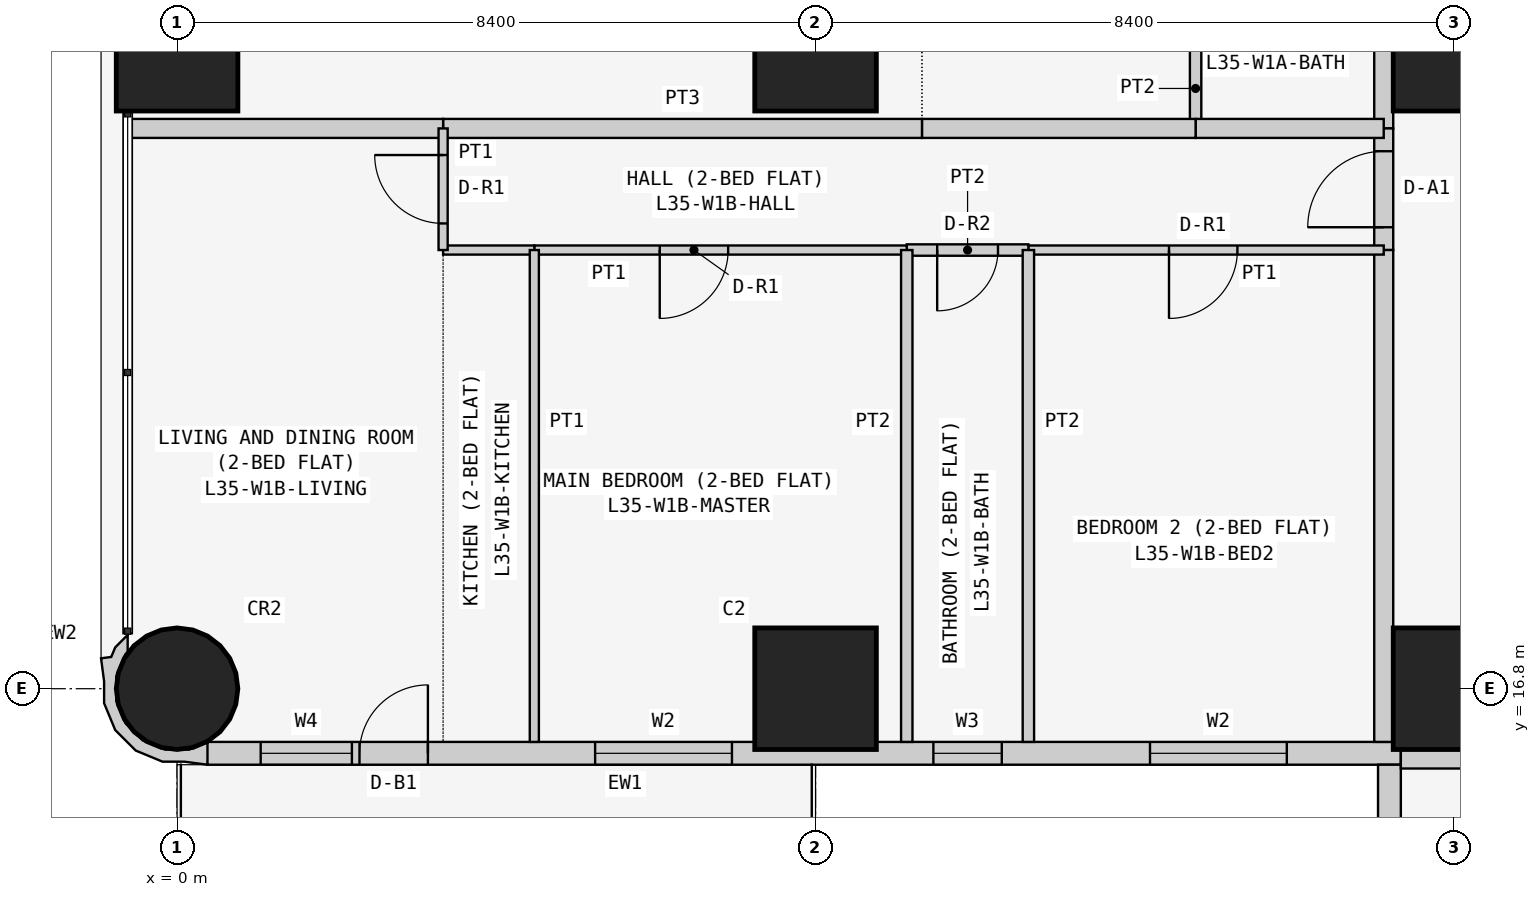
"""IFC4 building model, lengths in metres.
Left out: names, types, materials, properties, quantities, classifications, styles, units other than length and angle.
Written with IfcOpenShell. Run it as: python <this file> out.ifc"""

import sys

from ifc_helpers import new_model, si_unit, direction, frame, frame_2d, origin, origin_2d, place, context, subcontext, project, spatial, polyline, rectangle, circle, outline, extrude, element, fill, save


model = new_model("IFC4")
c1 = context("Model", 3, precision=1e-05, world=origin(), true_north=direction((0.0, 1.0)))
c2 = subcontext(c1, "Body", "Model", "MODEL_VIEW")
j1 = project(units=[si_unit("LENGTHUNIT", "METRE"), si_unit("PLANEANGLEUNIT", "RADIAN")], contexts=[c1])
p1 = place(None, origin())
s1 = spatial("IfcSite", under=j1, at=p1, CompositionType="ELEMENT")
p2 = place(p1, origin())
s2 = spatial("IfcBuilding", under=s1, at=p2, CompositionType="ELEMENT")
p3 = place(p2, frame((0.0, 0.0, 137.7)))
s3 = spatial("IfcBuildingStorey", under=s2, at=p3, CompositionType="ELEMENT", Elevation=137.7)
p4 = place(p3, frame((0.0, 16.8, 0.0), z_axis=(0.0, 0.0, 1.0), x_axis=(1.0, 0.0, 0.0)))
e1 = element("IfcColumn", 1, at=p4, inside=s3, PredefinedType="COLUMN", context=c2, shape_type="SweptSolid", body=[
    extrude(circle(Radius=0.8, at=origin_2d()), origin(), (0.0, 0.0, 1.0), 3.6),
])
for number, where, z_axis, x_axis in (
    (2, (0.0, 25.2, 0.0), (0.0, 0.0, 1.0), (1.0, 0.0, 0.0)),
    (3, (8.4, 16.8, 0.0), (0.0, 0.0, 1.0), (1.0, 0.0, 0.0)),
    (4, (8.4, 25.2, 0.0), (0.0, 0.0, 1.0), (1.0, 0.0, 0.0)),
    (5, (16.8, 16.8, 0.0), (0.0, 0.0, 1.0), (1.0, 0.0, 0.0)),
    (6, (16.8, 25.2, 0.0), (0.0, 0.0, 1.0), (1.0, 0.0, 0.0)),
):
    element("IfcColumn", number, at=place(p3, frame(where, z_axis=z_axis, x_axis=x_axis)), inside=s3, PredefinedType="COLUMN", context=c2, shape_type="SweptSolid", body=[
        extrude(rectangle(XDim=1.6, YDim=1.6, at=origin_2d()), origin(), (0.0, 0.0, 1.0), 3.6),
    ])
p5 = place(p3, frame((0.4, 15.95, 0.0), z_axis=(0.0, 0.0, 1.0), x_axis=(1.0, 0.0, 0.0)))
e7 = element("IfcWall", 7, at=p5, inside=s3, PredefinedType="SOLIDWALL", context=c2, shape_type="SweptSolid", body=[
    extrude(rectangle(XDim=15.7, YDim=0.3, at=frame_2d((7.85, 0.0))), origin(), (0.0, 0.0, 1.0), 3.45),
])
p6 = place(p5, frame((12.4, 0.0, 0.9)))
e8 = element("IfcOpeningElement", 8, at=p6, cuts=e7, PredefinedType="OPENING", context=c2, shape_type="SweptSolid", body=[
    extrude(rectangle(XDim=1.8, YDim=1.5, at=frame_2d((0.9, 0.75))), frame((0.0, 0.16, 0.0), z_axis=(0.0, -1.0, 0.0), x_axis=(1.0, 0.0, 0.0)), (0.0, 0.0, 1.0), 0.32),
])
p7 = place(p5, frame((9.55, 0.0, 1.5)))
e9 = element("IfcOpeningElement", 9, at=p7, cuts=e7, PredefinedType="OPENING", context=c2, shape_type="SweptSolid", body=[
    extrude(rectangle(XDim=0.9, YDim=0.7, at=frame_2d((0.45, 0.35))), frame((0.0, 0.16, 0.0), z_axis=(0.0, -1.0, 0.0), x_axis=(1.0, 0.0, 0.0)), (0.0, 0.0, 1.0), 0.32),
])
p8 = place(p5, frame((5.1, 0.0, 0.9)))
e10 = element("IfcOpeningElement", 10, at=p8, cuts=e7, PredefinedType="OPENING", context=c2, shape_type="SweptSolid", body=[
    extrude(rectangle(XDim=1.8, YDim=1.5, at=frame_2d((0.9, 0.75))), frame((0.0, 0.16, 0.0), z_axis=(0.0, -1.0, 0.0), x_axis=(1.0, 0.0, 0.0)), (0.0, 0.0, 1.0), 0.32),
])
p9 = place(p5, frame((2.0, 0.0, 0.0)))
e11 = element("IfcOpeningElement", 11, at=p9, cuts=e7, PredefinedType="OPENING", context=c2, shape_type="SweptSolid", body=[
    extrude(rectangle(XDim=0.9, YDim=2.4, at=frame_2d((0.45, 1.2))), frame((0.0, 0.16, 0.0), z_axis=(0.0, -1.0, 0.0), x_axis=(1.0, 0.0, 0.0)), (0.0, 0.0, 1.0), 0.32),
])
p10 = place(p5, frame((0.7, 0.0, 0.9)))
e12 = element("IfcOpeningElement", 12, at=p10, cuts=e7, PredefinedType="OPENING", context=c2, shape_type="SweptSolid", body=[
    extrude(rectangle(XDim=1.2, YDim=1.5, at=frame_2d((0.6, 0.75))), frame((0.0, 0.16, 0.0), z_axis=(0.0, -1.0, 0.0), x_axis=(1.0, 0.0, 0.0)), (0.0, 0.0, 1.0), 0.32),
])
p11 = place(p3, frame((15.95, 15.8, 0.0), z_axis=(0.0, 0.0, 1.0), x_axis=(0.0, -1.0, 0.0)))
e13 = element("IfcWall", 13, at=p11, inside=s3, PredefinedType="SOLIDWALL", context=c2, shape_type="SweptSolid", body=[
    extrude(rectangle(XDim=7.0, YDim=0.3, at=frame_2d((3.5, 0.0))), origin(), (0.0, 0.0, 1.0), 3.45),
])
p12 = place(p11, frame((1.5, 0.0, 0.9)))
e14 = element("IfcOpeningElement", 14, at=p12, cuts=e13, PredefinedType="OPENING", context=c2, shape_type="SweptSolid", body=[
    extrude(rectangle(XDim=2.4, YDim=1.5, at=frame_2d((1.2, 0.75))), frame((0.0, 0.16, 0.0), z_axis=(0.0, -1.0, 0.0), x_axis=(1.0, 0.0, 0.0)), (0.0, 0.0, 1.0), 0.32),
])
p13 = place(p11, frame((5.05, 0.0, 0.9)))
e15 = element("IfcOpeningElement", 15, at=p13, cuts=e13, PredefinedType="OPENING", context=c2, shape_type="SweptSolid", body=[
    extrude(rectangle(XDim=1.2, YDim=1.5, at=frame_2d((0.6, 0.75))), frame((0.0, 0.16, 0.0), z_axis=(0.0, -1.0, 0.0), x_axis=(1.0, 0.0, 0.0)), (0.0, 0.0, 1.0), 0.32),
])
p14 = place(p3, frame((-0.595, 17.448, 0.0), z_axis=(0.0, 0.0, 1.0), x_axis=(-0.93923434088, -0.343276641956, 0.0)))
e16 = element("IfcWall", 16, at=p14, inside=s3, PredefinedType="SOLIDWALL", context=c2, shape_type="SweptSolid", body=[
    extrude(outline(polyline([(-0.369, 1.89), (-0.509, 1.621), (-0.491, 1.614), (-0.479, 1.609), (-0.211, 1.62), (0.088, 1.511), (0.323, 1.295), (0.457, 1.006), (0.47, 0.688), (0.361, 0.389), (0.146, 0.154), (0.108, 0.137), (0.031, -0.075), (0.241, 0.023), (0.334, 0.124), (0.465, 0.094), (0.532, 0.393), (0.631, 0.663), (0.614, 1.045), (0.453, 1.391), (0.172, 1.649), (-0.098, 1.748), (-0.369, 1.89)])), origin(), (0.0, 0.0, 1.0), 3.45),
])
p15 = place(p3, frame((22.971, 15.875, 0.0), z_axis=(0.0, 0.0, 1.0), x_axis=(-1.0, 0.0, 0.0)))
e17 = element("IfcWall", 17, at=p15, inside=s3, PredefinedType="PARTITIONING", context=c2, shape_type="SweptSolid", body=[
    extrude(rectangle(XDim=6.871, YDim=0.25, at=frame_2d((3.436, 0.0))), origin(), (0.0, 0.0, 1.0), 3.45),
])
p16 = place(p3, frame((15.875, 24.171, 0.0), z_axis=(0.0, 0.0, 1.0), x_axis=(0.0, 1.0, 0.0)))
e18 = element("IfcWall", 18, at=p16, inside=s3, PredefinedType="PARTITIONING", context=c2, shape_type="SweptSolid", body=[
    extrude(rectangle(XDim=2.629, YDim=0.25, at=frame_2d((1.314, 0.0))), origin(), (0.0, 0.0, 1.0), 3.45),
])
p17 = place(p3, frame((15.875, 22.571, 0.0), z_axis=(0.0, 0.0, 1.0), x_axis=(0.0, 1.0, 0.0)))
e19 = element("IfcWall", 19, at=p17, inside=s3, PredefinedType="PARTITIONING", context=c2, shape_type="SweptSolid", body=[
    extrude(rectangle(XDim=1.6, YDim=0.25, at=frame_2d((0.8, 0.0))), origin(), (0.0, 0.0, 1.0), 3.45),
])
p18 = place(p17, frame((0.3, 0.0, 0.0)))
e20 = element("IfcOpeningElement", 20, at=p18, cuts=e19, PredefinedType="OPENING", context=c2, shape_type="SweptSolid", body=[
    extrude(rectangle(XDim=1.0, YDim=2.1, at=frame_2d((0.5, 1.05))), frame((0.0, 0.135, 0.0), z_axis=(0.0, -1.0, 0.0), x_axis=(1.0, 0.0, 0.0)), (0.0, 0.0, 1.0), 0.27),
])
p19 = place(p3, frame((15.875, 16.1, 0.0), z_axis=(0.0, 0.0, 1.0), x_axis=(0.0, 1.0, 0.0)))
e21 = element("IfcWall", 21, at=p19, inside=s3, PredefinedType="PARTITIONING", context=c2, shape_type="SweptSolid", body=[
    extrude(rectangle(XDim=6.471, YDim=0.25, at=frame_2d((3.235, 0.0))), origin(), (0.0, 0.0, 1.0), 3.45),
])
p20 = place(p3, frame((13.4, 26.8, 0.0), z_axis=(0.0, 0.0, 1.0), x_axis=(0.0, -1.0, 0.0)))
e22 = element("IfcWall", 22, at=p20, inside=s3, PredefinedType="PARTITIONING", context=c2, shape_type="SweptSolid", body=[
    extrude(rectangle(XDim=2.629, YDim=0.15, at=frame_2d((1.314, 0.0))), origin(), (0.0, 0.0, 1.0), 3.45),
])
p21 = place(p3, frame((13.4, 24.171, 0.0), z_axis=(0.0, 0.0, 1.0), x_axis=(1.0, 0.0, 0.0)))
e23 = element("IfcWall", 23, at=p21, inside=s3, PredefinedType="PARTITIONING", context=c2, shape_type="SweptSolid", body=[
    extrude(rectangle(XDim=2.475, YDim=0.25, at=frame_2d((1.238, 0.0))), origin(), (0.0, 0.0, 1.0), 3.45),
])
p22 = place(p3, frame((9.8, 24.171, 0.0), z_axis=(0.0, 0.0, 1.0), x_axis=(1.0, 0.0, 0.0)))
e24 = element("IfcWall", 24, at=p22, inside=s3, PredefinedType="PARTITIONING", context=c2, shape_type="SweptSolid", body=[
    extrude(rectangle(XDim=3.6, YDim=0.25, at=frame_2d((1.8, 0.0))), origin(), (0.0, 0.0, 1.0), 3.45),
])
p23 = place(p3, frame((3.5, 24.171, 0.0), z_axis=(0.0, 0.0, 1.0), x_axis=(1.0, 0.0, 0.0)))
e25 = element("IfcWall", 25, at=p23, inside=s3, PredefinedType="PARTITIONING", context=c2, shape_type="SweptSolid", body=[
    extrude(rectangle(XDim=6.3, YDim=0.25, at=frame_2d((3.15, 0.0))), origin(), (0.0, 0.0, 1.0), 3.45),
])
p24 = place(p3, frame((-0.65, 24.171, 0.0), z_axis=(0.0, 0.0, 1.0), x_axis=(1.0, 0.0, 0.0)))
e26 = element("IfcWall", 26, at=p24, inside=s3, PredefinedType="PARTITIONING", context=c2, shape_type="SweptSolid", body=[
    extrude(rectangle(XDim=4.15, YDim=0.25, at=frame_2d((2.075, 0.0))), origin(), (0.0, 0.0, 1.0), 3.45),
])
p25 = place(p3, frame((11.2, 22.571, 0.0), z_axis=(0.0, 0.0, 1.0), x_axis=(1.0, 0.0, 0.0)))
e27 = element("IfcWall", 27, at=p25, inside=s3, PredefinedType="PARTITIONING", context=c2, shape_type="SweptSolid", body=[
    extrude(rectangle(XDim=4.675, YDim=0.12, at=frame_2d((2.337, 0.0))), origin(), (0.0, 0.0, 1.0), 3.45),
])
p26 = place(p25, frame((1.85, 0.0, 0.0)))
e28 = element("IfcOpeningElement", 28, at=p26, cuts=e27, PredefinedType="OPENING", context=c2, shape_type="SweptSolid", body=[
    extrude(rectangle(XDim=0.9, YDim=2.1, at=frame_2d((0.45, 1.05))), frame((0.0, 0.07, 0.0), z_axis=(0.0, -1.0, 0.0), x_axis=(1.0, 0.0, 0.0)), (0.0, 0.0, 1.0), 0.14),
])
p27 = place(p3, frame((9.6, 22.571, 0.0), z_axis=(0.0, 0.0, 1.0), x_axis=(1.0, 0.0, 0.0)))
e29 = element("IfcWall", 29, at=p27, inside=s3, PredefinedType="PARTITIONING", context=c2, shape_type="SweptSolid", body=[
    extrude(rectangle(XDim=1.6, YDim=0.15, at=frame_2d((0.8, 0.0))), origin(), (0.0, 0.0, 1.0), 3.45),
])
p28 = place(p27, frame((0.4, 0.0, 0.0)))
e30 = element("IfcOpeningElement", 30, at=p28, cuts=e29, PredefinedType="OPENING", context=c2, shape_type="SweptSolid", body=[
    extrude(rectangle(XDim=0.8, YDim=2.1, at=frame_2d((0.4, 1.05))), frame((0.0, 0.085, 0.0), z_axis=(0.0, -1.0, 0.0), x_axis=(1.0, 0.0, 0.0)), (0.0, 0.0, 1.0), 0.17),
])
p29 = place(p3, frame((4.7, 22.571, 0.0), z_axis=(0.0, 0.0, 1.0), x_axis=(1.0, 0.0, 0.0)))
e31 = element("IfcWall", 31, at=p29, inside=s3, PredefinedType="PARTITIONING", context=c2, shape_type="SweptSolid", body=[
    extrude(rectangle(XDim=4.9, YDim=0.12, at=frame_2d((2.45, 0.0))), origin(), (0.0, 0.0, 1.0), 3.45),
])
p30 = place(p29, frame((1.65, 0.0, 0.0)))
e32 = element("IfcOpeningElement", 32, at=p30, cuts=e31, PredefinedType="OPENING", context=c2, shape_type="SweptSolid", body=[
    extrude(rectangle(XDim=0.9, YDim=2.1, at=frame_2d((0.45, 1.05))), frame((0.0, 0.07, 0.0), z_axis=(0.0, -1.0, 0.0), x_axis=(1.0, 0.0, 0.0)), (0.0, 0.0, 1.0), 0.14),
])
p31 = place(p3, frame((3.5, 22.571, 0.0), z_axis=(0.0, 0.0, 1.0), x_axis=(1.0, 0.0, 0.0)))
e33 = element("IfcWall", 33, at=p31, inside=s3, PredefinedType="PARTITIONING", context=c2, shape_type="SweptSolid", body=[
    extrude(rectangle(XDim=1.2, YDim=0.12, at=frame_2d((0.6, 0.0))), origin(), (0.0, 0.0, 1.0), 3.45),
])
p32 = place(p3, frame((3.5, 24.171, 0.0), z_axis=(0.0, 0.0, 1.0), x_axis=(0.0, -1.0, 0.0)))
e34 = element("IfcWall", 34, at=p32, inside=s3, PredefinedType="PARTITIONING", context=c2, shape_type="SweptSolid", body=[
    extrude(rectangle(XDim=1.6, YDim=0.12, at=frame_2d((0.8, 0.0))), origin(), (0.0, 0.0, 1.0), 3.45),
])
p33 = place(p32, frame((0.35, 0.0, 0.0)))
e35 = element("IfcOpeningElement", 35, at=p33, cuts=e34, PredefinedType="OPENING", context=c2, shape_type="SweptSolid", body=[
    extrude(rectangle(XDim=0.9, YDim=2.1, at=frame_2d((0.45, 1.05))), frame((0.0, 0.07, 0.0), z_axis=(0.0, -1.0, 0.0), x_axis=(1.0, 0.0, 0.0)), (0.0, 0.0, 1.0), 0.14),
])
for number, where, z_axis, x_axis in (
    (36, (11.2, 22.571, 0.0), (0.0, 0.0, 1.0), (0.0, -1.0, 0.0)),
    (37, (9.6, 22.571, 0.0), (0.0, 0.0, 1.0), (0.0, -1.0, 0.0)),
):
    element("IfcWall", number, at=place(p3, frame(where, z_axis=z_axis, x_axis=x_axis)), inside=s3, PredefinedType="PARTITIONING", context=c2, shape_type="SweptSolid", body=[
        extrude(rectangle(XDim=6.471, YDim=0.15, at=frame_2d((3.235, 0.0))), origin(), (0.0, 0.0, 1.0), 3.45),
    ])
p34 = place(p3, frame((4.7, 22.571, 0.0), z_axis=(0.0, 0.0, 1.0), x_axis=(0.0, -1.0, 0.0)))
e38 = element("IfcWall", 38, at=p34, inside=s3, PredefinedType="PARTITIONING", context=c2, shape_type="SweptSolid", body=[
    extrude(rectangle(XDim=6.471, YDim=0.12, at=frame_2d((3.235, 0.0))), origin(), (0.0, 0.0, 1.0), 3.45),
])
p35 = place(p6, origin())
e39 = element("IfcWindow", 39, at=p35, inside=s3, PartitioningType="SINGLE_PANEL", PredefinedType="WINDOW", context=c2, shape_type="SweptSolid", body=[
    extrude(rectangle(XDim=1.8, YDim=1.5, at=frame_2d((0.9, 0.75))), frame((0.0, 0.03, 0.0), z_axis=(0.0, -1.0, 0.0), x_axis=(1.0, 0.0, 0.0)), (0.0, 0.0, 1.0), 0.06),
])
fill(e8, e39)
p36 = place(p7, origin())
e40 = element("IfcWindow", 40, at=p36, inside=s3, PartitioningType="SINGLE_PANEL", PredefinedType="WINDOW", context=c2, shape_type="SweptSolid", body=[
    extrude(rectangle(XDim=0.9, YDim=0.7, at=frame_2d((0.45, 0.35))), frame((0.0, 0.03, 0.0), z_axis=(0.0, -1.0, 0.0), x_axis=(1.0, 0.0, 0.0)), (0.0, 0.0, 1.0), 0.06),
])
fill(e9, e40)
p37 = place(p8, origin())
e41 = element("IfcWindow", 41, at=p37, inside=s3, PartitioningType="SINGLE_PANEL", PredefinedType="WINDOW", context=c2, shape_type="SweptSolid", body=[
    extrude(rectangle(XDim=1.8, YDim=1.5, at=frame_2d((0.9, 0.75))), frame((0.0, 0.03, 0.0), z_axis=(0.0, -1.0, 0.0), x_axis=(1.0, 0.0, 0.0)), (0.0, 0.0, 1.0), 0.06),
])
fill(e10, e41)
p38 = place(p9, origin())
e42 = element("IfcDoor", 42, at=p38, inside=s3, OperationType="SINGLE_SWING_RIGHT", PredefinedType="DOOR", context=c2, shape_type="SweptSolid", body=[
    extrude(rectangle(XDim=0.9, YDim=2.4, at=frame_2d((0.45, 1.2))), frame((0.0, 0.025, 0.0), z_axis=(0.0, -1.0, 0.0), x_axis=(1.0, 0.0, 0.0)), (0.0, 0.0, 1.0), 0.05),
])
fill(e11, e42)
p39 = place(p10, origin())
e43 = element("IfcWindow", 43, at=p39, inside=s3, PartitioningType="SINGLE_PANEL", PredefinedType="WINDOW", context=c2, shape_type="SweptSolid", body=[
    extrude(rectangle(XDim=1.2, YDim=1.5, at=frame_2d((0.6, 0.75))), frame((0.0, 0.03, 0.0), z_axis=(0.0, -1.0, 0.0), x_axis=(1.0, 0.0, 0.0)), (0.0, 0.0, 1.0), 0.06),
])
fill(e12, e43)
p40 = place(p18, origin())
e44 = element("IfcDoor", 44, at=p40, inside=s3, OperationType="SINGLE_SWING_LEFT", PredefinedType="DOOR", context=c2, shape_type="SweptSolid", body=[
    extrude(rectangle(XDim=1.0, YDim=2.1, at=frame_2d((0.5, 1.05))), frame((0.0, 0.025, 0.0), z_axis=(0.0, -1.0, 0.0), x_axis=(1.0, 0.0, 0.0)), (0.0, 0.0, 1.0), 0.05),
])
fill(e20, e44)
p41 = place(p26, frame((0.9, 0.0, 0.0), z_axis=(0.0, 0.0, 1.0), x_axis=(-1.0, 0.0, 0.0)))
e45 = element("IfcDoor", 45, at=p41, inside=s3, OperationType="SINGLE_SWING_RIGHT", PredefinedType="DOOR", context=c2, shape_type="SweptSolid", body=[
    extrude(rectangle(XDim=0.9, YDim=2.1, at=frame_2d((0.45, 1.05))), frame((0.0, 0.025, 0.0), z_axis=(0.0, -1.0, 0.0), x_axis=(1.0, 0.0, 0.0)), (0.0, 0.0, 1.0), 0.05),
])
fill(e28, e45)
p42 = place(p28, frame((0.8, 0.0, 0.0), z_axis=(0.0, 0.0, 1.0), x_axis=(-1.0, 0.0, 0.0)))
e46 = element("IfcDoor", 46, at=p42, inside=s3, OperationType="SINGLE_SWING_RIGHT", PredefinedType="DOOR", context=c2, shape_type="SweptSolid", body=[
    extrude(rectangle(XDim=0.8, YDim=2.1, at=frame_2d((0.4, 1.05))), frame((0.0, 0.025, 0.0), z_axis=(0.0, -1.0, 0.0), x_axis=(1.0, 0.0, 0.0)), (0.0, 0.0, 1.0), 0.05),
])
fill(e30, e46)
p43 = place(p30, frame((0.9, 0.0, 0.0), z_axis=(0.0, 0.0, 1.0), x_axis=(-1.0, 0.0, 0.0)))
e47 = element("IfcDoor", 47, at=p43, inside=s3, OperationType="SINGLE_SWING_RIGHT", PredefinedType="DOOR", context=c2, shape_type="SweptSolid", body=[
    extrude(rectangle(XDim=0.9, YDim=2.1, at=frame_2d((0.45, 1.05))), frame((0.0, 0.025, 0.0), z_axis=(0.0, -1.0, 0.0), x_axis=(1.0, 0.0, 0.0)), (0.0, 0.0, 1.0), 0.05),
])
fill(e32, e47)
p44 = place(p33, frame((0.9, 0.0, 0.0), z_axis=(0.0, 0.0, 1.0), x_axis=(-1.0, 0.0, 0.0)))
e48 = element("IfcDoor", 48, at=p44, inside=s3, OperationType="SINGLE_SWING_RIGHT", PredefinedType="DOOR", context=c2, shape_type="SweptSolid", body=[
    extrude(rectangle(XDim=0.9, YDim=2.1, at=frame_2d((0.45, 1.05))), frame((0.0, 0.025, 0.0), z_axis=(0.0, -1.0, 0.0), x_axis=(1.0, 0.0, 0.0)), (0.0, 0.0, 1.0), 0.05),
])
fill(e35, e48)
save(model, sys.argv[1])
